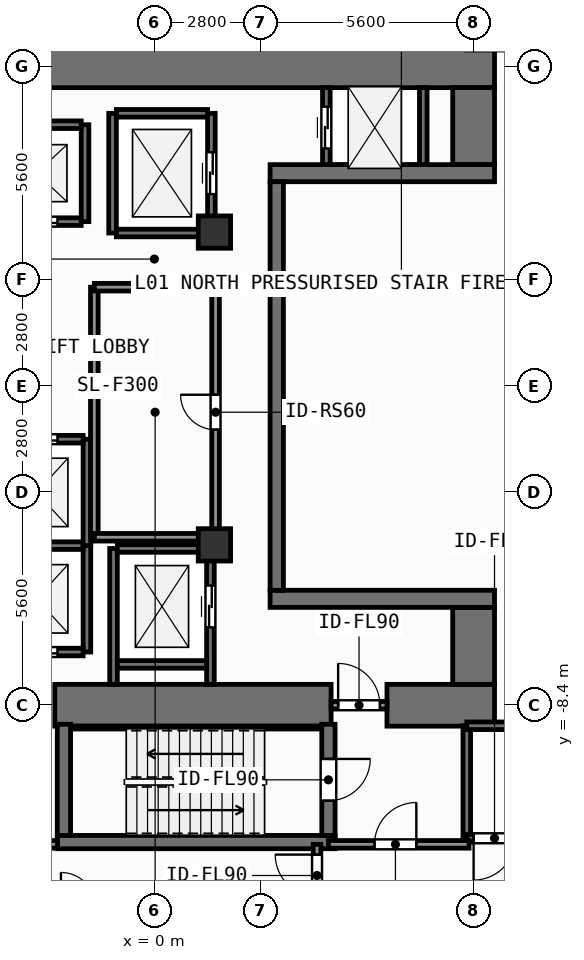
"""IFC4 building model, lengths in metres.
Left out: names, types, materials, properties, quantities, classifications, styles, units other than length and angle.
Written with IfcOpenShell. Run it as: python <this file> out.ifc"""

import sys

from ifc_helpers import new_model, si_unit, direction, frame, frame_2d, origin, origin_2d, place, context, subcontext, project, spatial, rectangle, extrude, element, fill, save


model = new_model("IFC4")
c1 = context("Model", 3, precision=1e-05, world=origin(), true_north=direction((0.0, 1.0)))
c2 = subcontext(c1, "Body", "Model", "MODEL_VIEW")
j1 = project(units=[si_unit("LENGTHUNIT", "METRE"), si_unit("PLANEANGLEUNIT", "RADIAN")], contexts=[c1])
p1 = place(None, origin())
s1 = spatial("IfcSite", under=j1, at=p1, CompositionType="ELEMENT")
p2 = place(p1, origin())
s2 = spatial("IfcBuilding", under=s1, at=p2, CompositionType="ELEMENT")
p3 = place(p2, origin())
s3 = spatial("IfcBuildingStorey", under=s2, at=p3, CompositionType="ELEMENT", Elevation=0.0)
p4 = place(p3, frame((-2.62, -8.4, 0.0), z_axis=(0.0, 0.0, 1.0), x_axis=(1.0, 0.0, 0.0)))
e1 = element("IfcWall", 1, at=p4, inside=s3, PredefinedType="SHEAR", context=c2, shape_type="SweptSolid", body=[
    extrude(rectangle(XDim=7.27, YDim=1.1, at=frame_2d((3.635, 0.0))), origin(), (0.0, 0.0, 1.0), 4.8),
])
p5 = place(p3, frame((6.12, -8.4, 0.0), z_axis=(0.0, 0.0, 1.0), x_axis=(1.0, 0.0, 0.0)))
e2 = element("IfcWall", 2, at=p5, inside=s3, PredefinedType="SHEAR", context=c2, shape_type="SweptSolid", body=[
    extrude(rectangle(XDim=2.83, YDim=1.1, at=frame_2d((1.415, 0.0))), origin(), (0.0, 0.0, 1.0), 4.8),
])
p6 = place(p3, frame((-7.55, 8.4, 0.0), z_axis=(0.0, 0.0, 1.0), x_axis=(1.0, 0.0, 0.0)))
e3 = element("IfcWall", 3, at=p6, inside=s3, PredefinedType="SHEAR", context=c2, shape_type="SweptSolid", body=[
    extrude(rectangle(XDim=16.5, YDim=1.1, at=frame_2d((8.25, 0.0))), origin(), (0.0, 0.0, 1.0), 4.8),
])
for number, where, z_axis, x_axis in (
    (4, (8.4, -7.85, 0.0), (0.0, 0.0, 1.0), (0.0, 1.0, 0.0)),
    (5, (8.4, 5.825, 0.0), (0.0, 0.0, 1.0), (0.0, 1.0, 0.0)),
):
    element("IfcWall", number, at=place(p3, frame(where, z_axis=z_axis, x_axis=x_axis)), inside=s3, PredefinedType="SHEAR", context=c2, shape_type="SweptSolid", body=[
        extrude(rectangle(XDim=2.025, YDim=1.1, at=frame_2d((1.013, 0.0))), origin(), (0.0, 0.0, 1.0), 4.8),
    ])
for number, where, z_axis, x_axis in (
    (6, (3.045, -5.6, 0.0), (0.0, 0.0, 1.0), (1.0, 0.0, 0.0)),
    (7, (3.045, 5.6, 0.0), (0.0, 0.0, 1.0), (1.0, 0.0, 0.0)),
):
    element("IfcWall", number, at=place(p3, frame(where, z_axis=z_axis, x_axis=x_axis)), inside=s3, PredefinedType="SHEAR", context=c2, shape_type="SweptSolid", body=[
        extrude(rectangle(XDim=5.905, YDim=0.45, at=frame_2d((2.953, 0.0))), origin(), (0.0, 0.0, 1.0), 4.8),
    ])
p7 = place(p3, frame((3.22, -5.375, 0.0), z_axis=(0.0, 0.0, 1.0), x_axis=(0.0, 1.0, 0.0)))
e8 = element("IfcWall", 8, at=p7, inside=s3, PredefinedType="SHEAR", context=c2, shape_type="SweptSolid", body=[
    extrude(rectangle(XDim=10.75, YDim=0.35, at=frame_2d((5.375, 0.0))), origin(), (0.0, 0.0, 1.0), 4.8),
])
p8 = place(p3, frame((-2.555, -12.0, 0.0), z_axis=(0.0, 0.0, 1.0), x_axis=(1.0, 0.0, 0.0)))
e9 = element("IfcWall", 9, at=p8, inside=s3, PredefinedType="SHEAR", context=c2, shape_type="SweptSolid", body=[
    extrude(rectangle(XDim=7.31, YDim=0.35, at=frame_2d((3.655, 0.0))), origin(), (0.0, 0.0, 1.0), 4.8),
])
p9 = place(p3, frame((-2.2, -8.988, 0.0), z_axis=(0.0, 0.0, 1.0), x_axis=(1.0, 0.0, 0.0)))
e10 = element("IfcWall", 10, at=p9, inside=s3, PredefinedType="SHEAR", context=c2, shape_type="SweptSolid", body=[
    extrude(rectangle(XDim=6.6, YDim=0.075, at=frame_2d((3.3, 0.0))), origin(), (0.0, 0.0, 1.0), 4.8),
])
p10 = place(p3, frame((-2.38, -11.825, 0.0), z_axis=(0.0, 0.0, 1.0), x_axis=(0.0, 1.0, 0.0)))
e11 = element("IfcWall", 11, at=p10, inside=s3, PredefinedType="SHEAR", context=c2, shape_type="SweptSolid", body=[
    extrude(rectangle(XDim=2.925, YDim=0.35, at=frame_2d((1.462, 0.0))), origin(), (0.0, 0.0, 1.0), 4.8),
])
p11 = place(p3, frame((4.58, -8.9, 0.0), z_axis=(0.0, 0.0, 1.0), x_axis=(0.0, -1.0, 0.0)))
e12 = element("IfcWall", 12, at=p11, inside=s3, PredefinedType="SHEAR", context=c2, shape_type="SweptSolid", body=[
    extrude(rectangle(XDim=2.925, YDim=0.35, at=frame_2d((1.462, 0.0))), origin(), (0.0, 0.0, 1.0), 4.8),
])
p12 = place(p11, frame((0.913, 0.0, 0.0)))
e13 = element("IfcOpeningElement", 13, at=p12, cuts=e12, PredefinedType="OPENING", context=c2, shape_type="SweptSolid", body=[
    extrude(rectangle(XDim=1.1, YDim=2.15, at=frame_2d((0.55, 1.075))), frame((0.0, 0.185, 0.0), z_axis=(0.0, -1.0, 0.0), x_axis=(1.0, 0.0, 0.0)), (0.0, 0.0, 1.0), 0.37),
])
for number, where, z_axis, x_axis in (
    (14, (1.58, -4.18, 0.0), (0.0, 0.0, 1.0), (1.0, 0.0, 0.0)),
    (15, (1.58, 4.05, 0.0), (0.0, 0.0, 1.0), (1.0, 0.0, 0.0)),
):
    element("IfcColumn", number, at=place(p3, frame(where, z_axis=z_axis, x_axis=x_axis)), inside=s3, PredefinedType="COLUMN", context=c2, shape_type="SweptSolid", body=[
        extrude(rectangle(XDim=0.85, YDim=0.85, at=origin_2d()), origin(), (0.0, 0.0, 1.0), 4.8),
    ])
p13 = place(p3, frame((-1.825, 4.325, 0.0), z_axis=(0.0, 0.0, 1.0), x_axis=(0.0, 1.0, 0.0)))
e16 = element("IfcWall", 16, at=p13, inside=s3, PredefinedType="SHEAR", context=c2, shape_type="SweptSolid", body=[
    extrude(rectangle(XDim=2.55, YDim=0.2, at=frame_2d((1.275, 0.0))), origin(), (0.0, 0.0, 1.0), 4.56),
])
p14 = place(p3, frame((-4.275, 4.325, 0.0), z_axis=(0.0, 0.0, 1.0), x_axis=(1.0, 0.0, 0.0)))
e17 = element("IfcWall", 17, at=p14, inside=s3, PredefinedType="SHEAR", context=c2, shape_type="SweptSolid", body=[
    extrude(rectangle(XDim=2.35, YDim=0.2, at=frame_2d((1.175, 0.0))), origin(), (0.0, 0.0, 1.0), 4.56),
])
p15 = place(p14, frame((0.625, 0.0, 0.0)))
e18 = element("IfcOpeningElement", 18, at=p15, cuts=e17, PredefinedType="OPENING", context=c2, shape_type="SweptSolid", body=[
    extrude(rectangle(XDim=1.1, YDim=2.2, at=frame_2d((0.55, 1.1))), frame((0.0, 0.11, 0.0), z_axis=(0.0, -1.0, 0.0), x_axis=(1.0, 0.0, 0.0)), (0.0, 0.0, 1.0), 0.22),
])
p16 = place(p3, frame((-4.275, 6.875, 0.0), z_axis=(0.0, 0.0, 1.0), x_axis=(1.0, 0.0, 0.0)))
e19 = element("IfcWall", 19, at=p16, inside=s3, PredefinedType="SHEAR", context=c2, shape_type="SweptSolid", body=[
    extrude(rectangle(XDim=2.35, YDim=0.2, at=frame_2d((1.175, 0.0))), origin(), (0.0, 0.0, 1.0), 4.56),
])
p17 = place(p3, frame((-1.775, -7.0, 0.0), z_axis=(0.0, 0.0, 1.0), x_axis=(0.0, 1.0, 0.0)))
e20 = element("IfcWall", 20, at=p17, inside=s3, PredefinedType="SHEAR", context=c2, shape_type="SweptSolid", body=[
    extrude(rectangle(XDim=2.8, YDim=0.2, at=frame_2d((1.4, 0.0))), origin(), (0.0, 0.0, 1.0), 4.56),
])
p18 = place(p3, frame((-4.325, -7.0, 0.0), z_axis=(0.0, 0.0, 1.0), x_axis=(1.0, 0.0, 0.0)))
e21 = element("IfcWall", 21, at=p18, inside=s3, PredefinedType="SHEAR", context=c2, shape_type="SweptSolid", body=[
    extrude(rectangle(XDim=2.45, YDim=0.2, at=frame_2d((1.225, 0.0))), origin(), (0.0, 0.0, 1.0), 4.56),
])
p19 = place(p18, frame((0.675, 0.0, 0.0)))
e22 = element("IfcOpeningElement", 22, at=p19, cuts=e21, PredefinedType="OPENING", context=c2, shape_type="SweptSolid", body=[
    extrude(rectangle(XDim=1.1, YDim=2.2, at=frame_2d((0.55, 1.1))), frame((0.0, 0.11, 0.0), z_axis=(0.0, -1.0, 0.0), x_axis=(1.0, 0.0, 0.0)), (0.0, 0.0, 1.0), 0.22),
])
p20 = place(p3, frame((-4.325, -4.2, 0.0), z_axis=(0.0, 0.0, 1.0), x_axis=(1.0, 0.0, 0.0)))
e23 = element("IfcWall", 23, at=p20, inside=s3, PredefinedType="SHEAR", context=c2, shape_type="SweptSolid", body=[
    extrude(rectangle(XDim=2.45, YDim=0.2, at=frame_2d((1.225, 0.0))), origin(), (0.0, 0.0, 1.0), 4.56),
])
p21 = place(p3, frame((-1.775, -4.2, 0.0), z_axis=(0.0, 0.0, 1.0), x_axis=(0.0, 1.0, 0.0)))
e24 = element("IfcWall", 24, at=p21, inside=s3, PredefinedType="SHEAR", context=c2, shape_type="SweptSolid", body=[
    extrude(rectangle(XDim=2.8, YDim=0.2, at=frame_2d((1.4, 0.0))), origin(), (0.0, 0.0, 1.0), 4.56),
])
p22 = place(p3, frame((-4.325, -1.4, 0.0), z_axis=(0.0, 0.0, 1.0), x_axis=(1.0, 0.0, 0.0)))
e25 = element("IfcWall", 25, at=p22, inside=s3, PredefinedType="SHEAR", context=c2, shape_type="SweptSolid", body=[
    extrude(rectangle(XDim=2.45, YDim=0.2, at=frame_2d((1.225, 0.0))), origin(), (0.0, 0.0, 1.0), 4.56),
])
p23 = place(p22, frame((0.675, 0.0, 0.0)))
e26 = element("IfcOpeningElement", 26, at=p23, cuts=e25, PredefinedType="OPENING", context=c2, shape_type="SweptSolid", body=[
    extrude(rectangle(XDim=1.1, YDim=2.2, at=frame_2d((0.55, 1.1))), frame((0.0, 0.11, 0.0), z_axis=(0.0, -1.0, 0.0), x_axis=(1.0, 0.0, 0.0)), (0.0, 0.0, 1.0), 0.22),
])
p24 = place(p3, frame((-1.1, 4.025, 0.0), z_axis=(0.0, 0.0, 1.0), x_axis=(0.0, 1.0, 0.0)))
e27 = element("IfcWall", 27, at=p24, inside=s3, PredefinedType="SHEAR", context=c2, shape_type="SweptSolid", body=[
    extrude(rectangle(XDim=3.15, YDim=0.2, at=frame_2d((1.575, 0.0))), origin(), (0.0, 0.0, 1.0), 4.56),
])
p25 = place(p3, frame((1.5, 4.025, 0.0), z_axis=(0.0, 0.0, 1.0), x_axis=(0.0, 1.0, 0.0)))
e28 = element("IfcWall", 28, at=p25, inside=s3, PredefinedType="SHEAR", context=c2, shape_type="SweptSolid", body=[
    extrude(rectangle(XDim=3.15, YDim=0.2, at=frame_2d((1.575, 0.0))), origin(), (0.0, 0.0, 1.0), 4.56),
])
p26 = place(p25, frame((1.025, 0.0, 0.0)))
e29 = element("IfcOpeningElement", 29, at=p26, cuts=e28, PredefinedType="OPENING", context=c2, shape_type="SweptSolid", body=[
    extrude(rectangle(XDim=1.1, YDim=2.2, at=frame_2d((0.55, 1.1))), frame((0.0, 0.11, 0.0), z_axis=(0.0, -1.0, 0.0), x_axis=(1.0, 0.0, 0.0)), (0.0, 0.0, 1.0), 0.22),
])
for number, where, z_axis, x_axis in (
    (30, (-1.0, 4.025, 0.0), (0.0, 0.0, 1.0), (1.0, 0.0, 0.0)),
    (31, (-1.0, 7.175, 0.0), (0.0, 0.0, 1.0), (1.0, 0.0, 0.0)),
):
    element("IfcWall", number, at=place(p3, frame(where, z_axis=z_axis, x_axis=x_axis)), inside=s3, PredefinedType="SHEAR", context=c2, shape_type="SweptSolid", body=[
        extrude(rectangle(XDim=2.4, YDim=0.2, at=frame_2d((1.2, 0.0))), origin(), (0.0, 0.0, 1.0), 4.56),
    ])
p27 = place(p3, frame((-1.075, -7.85, 0.0), z_axis=(0.0, 0.0, 1.0), x_axis=(0.0, 1.0, 0.0)))
e32 = element("IfcWall", 32, at=p27, inside=s3, PredefinedType="SHEAR", context=c2, shape_type="SweptSolid", body=[
    extrude(rectangle(XDim=3.575, YDim=0.2, at=frame_2d((1.788, 0.0))), origin(), (0.0, 0.0, 1.0), 4.56),
])
p28 = place(p3, frame((1.475, -7.85, 0.0), z_axis=(0.0, 0.0, 1.0), x_axis=(0.0, 1.0, 0.0)))
e33 = element("IfcWall", 33, at=p28, inside=s3, PredefinedType="SHEAR", context=c2, shape_type="SweptSolid", body=[
    extrude(rectangle(XDim=3.575, YDim=0.2, at=frame_2d((1.788, 0.0))), origin(), (0.0, 0.0, 1.0), 4.56),
])
p29 = place(p28, frame((1.5, 0.0, 0.0)))
e34 = element("IfcOpeningElement", 34, at=p29, cuts=e33, PredefinedType="OPENING", context=c2, shape_type="SweptSolid", body=[
    extrude(rectangle(XDim=1.1, YDim=2.2, at=frame_2d((0.55, 1.1))), frame((0.0, 0.11, 0.0), z_axis=(0.0, -1.0, 0.0), x_axis=(1.0, 0.0, 0.0)), (0.0, 0.0, 1.0), 0.22),
])
for number, where, z_axis, x_axis in (
    (35, (-0.975, -7.325, 0.0), (0.0, 0.0, 1.0), (1.0, 0.0, 0.0)),
    (36, (-0.975, -4.275, 0.0), (0.0, 0.0, 1.0), (1.0, 0.0, 0.0)),
):
    element("IfcWall", number, at=place(p3, frame(where, z_axis=z_axis, x_axis=x_axis)), inside=s3, PredefinedType="SHEAR", context=c2, shape_type="SweptSolid", body=[
        extrude(rectangle(XDim=2.35, YDim=0.2, at=frame_2d((1.175, 0.0))), origin(), (0.0, 0.0, 1.0), 4.56),
    ])
p30 = place(p3, frame((4.525, 5.825, 0.0), z_axis=(0.0, 0.0, 1.0), x_axis=(0.0, 1.0, 0.0)))
e37 = element("IfcWall", 37, at=p30, inside=s3, PredefinedType="SHEAR", context=c2, shape_type="SweptSolid", body=[
    extrude(rectangle(XDim=2.025, YDim=0.2, at=frame_2d((1.013, 0.0))), origin(), (0.0, 0.0, 1.0), 4.56),
])
p31 = place(p30, frame((0.425, 0.0, 0.0)))
e38 = element("IfcOpeningElement", 38, at=p31, cuts=e37, PredefinedType="OPENING", context=c2, shape_type="SweptSolid", body=[
    extrude(rectangle(XDim=1.1, YDim=2.2, at=frame_2d((0.55, 1.1))), frame((0.0, 0.11, 0.0), z_axis=(0.0, -1.0, 0.0), x_axis=(1.0, 0.0, 0.0)), (0.0, 0.0, 1.0), 0.22),
])
p32 = place(p3, frame((7.075, 5.825, 0.0), z_axis=(0.0, 0.0, 1.0), x_axis=(0.0, 1.0, 0.0)))
e39 = element("IfcWall", 39, at=p32, inside=s3, PredefinedType="SHEAR", context=c2, shape_type="SweptSolid", body=[
    extrude(rectangle(XDim=2.025, YDim=0.2, at=frame_2d((1.013, 0.0))), origin(), (0.0, 0.0, 1.0), 4.56),
])
p33 = place(p3, frame((8.22, -11.9, 0.0), z_axis=(0.0, 0.0, 1.0), x_axis=(0.0, 1.0, 0.0)))
e40 = element("IfcWall", 40, at=p33, inside=s3, PredefinedType="SHEAR", context=c2, shape_type="SweptSolid", body=[
    extrude(rectangle(XDim=2.96, YDim=0.2, at=frame_2d((1.48, 0.0))), origin(), (0.0, 0.0, 1.0), 4.56),
])
p34 = place(p3, frame((14.38, -11.9, 0.0), z_axis=(0.0, 0.0, 1.0), x_axis=(-1.0, 0.0, 0.0)))
e41 = element("IfcWall", 41, at=p34, inside=s3, PredefinedType="SHEAR", context=c2, shape_type="SweptSolid", body=[
    extrude(rectangle(XDim=6.16, YDim=0.2, at=frame_2d((3.08, 0.0))), origin(), (0.0, 0.0, 1.0), 4.56),
])
p35 = place(p34, frame((4.88, 0.0, 0.0)))
e42 = element("IfcOpeningElement", 42, at=p35, cuts=e41, PredefinedType="OPENING", context=c2, shape_type="SweptSolid", body=[
    extrude(rectangle(XDim=1.1, YDim=2.15, at=frame_2d((0.55, 1.075))), frame((0.0, 0.11, 0.0), z_axis=(0.0, -1.0, 0.0), x_axis=(1.0, 0.0, 0.0)), (0.0, 0.0, 1.0), 0.22),
])
p36 = place(p3, frame((8.22, -8.94, 0.0), z_axis=(0.0, 0.0, 1.0), x_axis=(1.0, 0.0, 0.0)))
e43 = element("IfcWall", 43, at=p36, inside=s3, PredefinedType="SHEAR", context=c2, shape_type="SweptSolid", body=[
    extrude(rectangle(XDim=6.16, YDim=0.2, at=frame_2d((3.08, 0.0))), origin(), (0.0, 0.0, 1.0), 4.56),
])
p37 = place(p3, frame((4.58, -12.06, 0.0), z_axis=(0.0, 0.0, 1.0), x_axis=(1.0, 0.0, 0.0)))
e44 = element("IfcWall", 44, at=p37, inside=s3, PredefinedType="SOLIDWALL", context=c2, shape_type="SweptSolid", body=[
    extrude(rectangle(XDim=3.7, YDim=0.2, at=frame_2d((1.85, 0.0))), origin(), (0.0, 0.0, 1.0), 4.56),
])
p38 = place(p37, frame((1.212, 0.0, 0.0)))
e45 = element("IfcOpeningElement", 45, at=p38, cuts=e44, PredefinedType="OPENING", context=c2, shape_type="SweptSolid", body=[
    extrude(rectangle(XDim=1.1, YDim=2.15, at=frame_2d((0.55, 1.075))), frame((0.0, 0.11, 0.0), z_axis=(0.0, -1.0, 0.0), x_axis=(1.0, 0.0, 0.0)), (0.0, 0.0, 1.0), 0.22),
])
p39 = place(p3, frame((4.65, -8.4, 0.0), z_axis=(0.0, 0.0, 1.0), x_axis=(1.0, 0.0, 0.0)))
e46 = element("IfcWall", 46, at=p39, inside=s3, PredefinedType="SOLIDWALL", context=c2, shape_type="SweptSolid", body=[
    extrude(rectangle(XDim=1.47, YDim=0.2, at=frame_2d((0.735, 0.0))), origin(), (0.0, 0.0, 1.0), 3.6),
])
p40 = place(p39, frame((0.185, 0.0, 0.0)))
e47 = element("IfcOpeningElement", 47, at=p40, cuts=e46, PredefinedType="OPENING", context=c2, shape_type="SweptSolid", body=[
    extrude(rectangle(XDim=1.1, YDim=2.15, at=frame_2d((0.55, 1.075))), frame((0.0, 0.11, 0.0), z_axis=(0.0, -1.0, 0.0), x_axis=(1.0, 0.0, 0.0)), (0.0, 0.0, 1.0), 0.22),
])
p41 = place(p3, frame((-4.3, -12.06, 0.0), z_axis=(0.0, 0.0, 1.0), x_axis=(1.0, 0.0, 0.0)))
e48 = element("IfcWall", 48, at=p41, inside=s3, PredefinedType="SOLIDWALL", context=c2, shape_type="SweptSolid", body=[
    extrude(rectangle(XDim=1.75, YDim=0.2, at=frame_2d((0.875, 0.0))), origin(), (0.0, 0.0, 1.0), 4.56),
])
p42 = place(p41, frame((0.325, 0.0, 0.0)))
e49 = element("IfcOpeningElement", 49, at=p42, cuts=e48, PredefinedType="OPENING", context=c2, shape_type="SweptSolid", body=[
    extrude(rectangle(XDim=1.1, YDim=2.15, at=frame_2d((0.55, 1.075))), frame((0.0, 0.11, 0.0), z_axis=(0.0, -1.0, 0.0), x_axis=(1.0, 0.0, 0.0)), (0.0, 0.0, 1.0), 0.22),
])
p43 = place(p3, frame((1.61, -3.98, 0.0), z_axis=(0.0, 0.0, 1.0), x_axis=(0.0, 1.0, 0.0)))
e50 = element("IfcWall", 50, at=p43, inside=s3, PredefinedType="SOLIDWALL", context=c2, shape_type="SweptSolid", body=[
    extrude(rectangle(XDim=6.58, YDim=0.2, at=frame_2d((3.29, 0.0))), origin(), (0.0, 0.0, 1.0), 4.56),
])
p44 = place(p43, frame((2.83, 0.0, 0.0)))
e51 = element("IfcOpeningElement", 51, at=p44, cuts=e50, PredefinedType="OPENING", context=c2, shape_type="SweptSolid", body=[
    extrude(rectangle(XDim=0.92, YDim=2.1, at=frame_2d((0.46, 1.05))), frame((0.0, 0.11, 0.0), z_axis=(0.0, -1.0, 0.0), x_axis=(1.0, 0.0, 0.0)), (0.0, 0.0, 1.0), 0.22),
])
p45 = place(p3, frame((4.28, -13.7, 0.0), z_axis=(0.0, 0.0, 1.0), x_axis=(0.0, 1.0, 0.0)))
e52 = element("IfcWall", 52, at=p45, inside=s3, PredefinedType="SOLIDWALL", context=c2, shape_type="SweptSolid", body=[
    extrude(rectangle(XDim=1.64, YDim=0.2, at=frame_2d((0.82, 0.0))), origin(), (0.0, 0.0, 1.0), 4.56),
])
p46 = place(p45, frame((0.27, 0.0, 0.0)))
e53 = element("IfcOpeningElement", 53, at=p46, cuts=e52, PredefinedType="OPENING", context=c2, shape_type="SweptSolid", body=[
    extrude(rectangle(XDim=1.1, YDim=2.15, at=frame_2d((0.55, 1.075))), frame((0.0, 0.11, 0.0), z_axis=(0.0, -1.0, 0.0), x_axis=(1.0, 0.0, 0.0)), (0.0, 0.0, 1.0), 0.22),
])
p47 = place(p3, frame((-1.58, -3.98, 0.0), z_axis=(0.0, 0.0, 1.0), x_axis=(0.0, 1.0, 0.0)))
e54 = element("IfcWall", 54, at=p47, inside=s3, PredefinedType="SOLIDWALL", context=c2, shape_type="SweptSolid", body=[
    extrude(rectangle(XDim=6.58, YDim=0.2, at=frame_2d((3.29, 0.0))), origin(), (0.0, 0.0, 1.0), 4.56),
])
for number, where, z_axis, x_axis in (
    (55, (-1.58, -3.98, 0.0), (0.0, 0.0, 1.0), (1.0, 0.0, 0.0)),
    (56, (-1.58, 2.6, 0.0), (0.0, 0.0, 1.0), (1.0, 0.0, 0.0)),
):
    element("IfcWall", number, at=place(p3, frame(where, z_axis=z_axis, x_axis=x_axis)), inside=s3, PredefinedType="SOLIDWALL", context=c2, shape_type="SweptSolid", body=[
        extrude(rectangle(XDim=3.19, YDim=0.2, at=frame_2d((1.595, 0.0))), origin(), (0.0, 0.0, 1.0), 4.56),
    ])
p48 = place(p15, origin())
e57 = element("IfcDoor", 57, at=p48, inside=s3, OperationType="SLIDING_TO_LEFT", PredefinedType="DOOR", context=c2, shape_type="SweptSolid", body=[
    extrude(rectangle(XDim=1.1, YDim=2.2, at=frame_2d((0.55, 1.1))), frame((0.0, 0.025, 0.0), z_axis=(0.0, -1.0, 0.0), x_axis=(1.0, 0.0, 0.0)), (0.0, 0.0, 1.0), 0.05),
])
fill(e18, e57)
p49 = place(p19, origin())
e58 = element("IfcDoor", 58, at=p49, inside=s3, OperationType="SLIDING_TO_LEFT", PredefinedType="DOOR", context=c2, shape_type="SweptSolid", body=[
    extrude(rectangle(XDim=1.1, YDim=2.2, at=frame_2d((0.55, 1.1))), frame((0.0, 0.025, 0.0), z_axis=(0.0, -1.0, 0.0), x_axis=(1.0, 0.0, 0.0)), (0.0, 0.0, 1.0), 0.05),
])
fill(e22, e58)
p50 = place(p23, origin())
e59 = element("IfcDoor", 59, at=p50, inside=s3, OperationType="SLIDING_TO_LEFT", PredefinedType="DOOR", context=c2, shape_type="SweptSolid", body=[
    extrude(rectangle(XDim=1.1, YDim=2.2, at=frame_2d((0.55, 1.1))), frame((0.0, 0.025, 0.0), z_axis=(0.0, -1.0, 0.0), x_axis=(1.0, 0.0, 0.0)), (0.0, 0.0, 1.0), 0.05),
])
fill(e26, e59)
p51 = place(p26, origin())
e60 = element("IfcDoor", 60, at=p51, inside=s3, OperationType="SLIDING_TO_LEFT", PredefinedType="DOOR", context=c2, shape_type="SweptSolid", body=[
    extrude(rectangle(XDim=1.1, YDim=2.2, at=frame_2d((0.55, 1.1))), frame((0.0, 0.025, 0.0), z_axis=(0.0, -1.0, 0.0), x_axis=(1.0, 0.0, 0.0)), (0.0, 0.0, 1.0), 0.05),
])
fill(e29, e60)
p52 = place(p29, origin())
e61 = element("IfcDoor", 61, at=p52, inside=s3, OperationType="SLIDING_TO_LEFT", PredefinedType="DOOR", context=c2, shape_type="SweptSolid", body=[
    extrude(rectangle(XDim=1.1, YDim=2.2, at=frame_2d((0.55, 1.1))), frame((0.0, 0.025, 0.0), z_axis=(0.0, -1.0, 0.0), x_axis=(1.0, 0.0, 0.0)), (0.0, 0.0, 1.0), 0.05),
])
fill(e34, e61)
p53 = place(p31, origin())
e62 = element("IfcDoor", 62, at=p53, inside=s3, OperationType="SLIDING_TO_LEFT", PredefinedType="DOOR", context=c2, shape_type="SweptSolid", body=[
    extrude(rectangle(XDim=1.1, YDim=2.2, at=frame_2d((0.55, 1.1))), frame((0.0, 0.025, 0.0), z_axis=(0.0, -1.0, 0.0), x_axis=(1.0, 0.0, 0.0)), (0.0, 0.0, 1.0), 0.05),
])
fill(e38, e62)
p54 = place(p12, origin())
e63 = element("IfcDoor", 63, at=p54, inside=s3, OperationType="SINGLE_SWING_LEFT", PredefinedType="DOOR", context=c2, shape_type="SweptSolid", body=[
    extrude(rectangle(XDim=1.1, YDim=2.15, at=frame_2d((0.55, 1.075))), frame((0.0, 0.025, 0.0), z_axis=(0.0, -1.0, 0.0), x_axis=(1.0, 0.0, 0.0)), (0.0, 0.0, 1.0), 0.05),
])
fill(e13, e63)
p55 = place(p35, origin())
e64 = element("IfcDoor", 64, at=p55, inside=s3, OperationType="SINGLE_SWING_RIGHT", PredefinedType="DOOR", context=c2, shape_type="SweptSolid", body=[
    extrude(rectangle(XDim=1.1, YDim=2.15, at=frame_2d((0.55, 1.075))), frame((0.0, 0.025, 0.0), z_axis=(0.0, -1.0, 0.0), x_axis=(1.0, 0.0, 0.0)), (0.0, 0.0, 1.0), 0.05),
])
fill(e42, e64)
p56 = place(p38, origin())
e65 = element("IfcDoor", 65, at=p56, inside=s3, OperationType="SINGLE_SWING_RIGHT", PredefinedType="DOOR", context=c2, shape_type="SweptSolid", body=[
    extrude(rectangle(XDim=1.1, YDim=2.15, at=frame_2d((0.55, 1.075))), frame((0.0, 0.025, 0.0), z_axis=(0.0, -1.0, 0.0), x_axis=(1.0, 0.0, 0.0)), (0.0, 0.0, 1.0), 0.05),
])
fill(e45, e65)
p57 = place(p40, origin())
e66 = element("IfcDoor", 66, at=p57, inside=s3, OperationType="SINGLE_SWING_LEFT", PredefinedType="DOOR", context=c2, shape_type="SweptSolid", body=[
    extrude(rectangle(XDim=1.1, YDim=2.15, at=frame_2d((0.55, 1.075))), frame((0.0, 0.025, 0.0), z_axis=(0.0, -1.0, 0.0), x_axis=(1.0, 0.0, 0.0)), (0.0, 0.0, 1.0), 0.05),
])
fill(e47, e66)
p58 = place(p44, origin())
e67 = element("IfcDoor", 67, at=p58, inside=s3, OperationType="SINGLE_SWING_RIGHT", PredefinedType="DOOR", context=c2, shape_type="SweptSolid", body=[
    extrude(rectangle(XDim=0.92, YDim=2.1, at=frame_2d((0.46, 1.05))), frame((0.0, 0.025, 0.0), z_axis=(0.0, -1.0, 0.0), x_axis=(1.0, 0.0, 0.0)), (0.0, 0.0, 1.0), 0.05),
])
fill(e51, e67)
p59 = place(p46, origin())
e68 = element("IfcDoor", 68, at=p59, inside=s3, OperationType="SINGLE_SWING_RIGHT", PredefinedType="DOOR", context=c2, shape_type="SweptSolid", body=[
    extrude(rectangle(XDim=1.1, YDim=2.15, at=frame_2d((0.55, 1.075))), frame((0.0, 0.025, 0.0), z_axis=(0.0, -1.0, 0.0), x_axis=(1.0, 0.0, 0.0)), (0.0, 0.0, 1.0), 0.05),
])
fill(e53, e68)
save(model, sys.argv[1])
